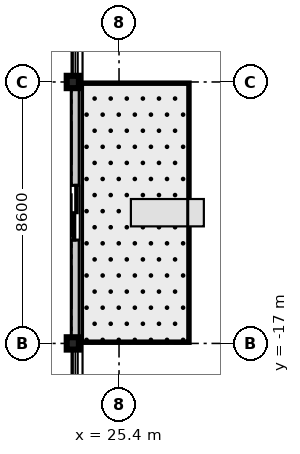
"""IFC4 building model, lengths in metres.
Left out: names, types, materials, properties, quantities, classifications, styles, units other than length and angle.
Written with IfcOpenShell. Run it as: python <this file> out.ifc"""

import sys

from ifc_helpers import new_model, si_unit, direction, frame, frame_2d, origin, origin_2d, place, context, subcontext, project, spatial, rectangle, i_section, extrude, source, transform, mapped, element, fill, save


model = new_model("IFC4")
c1 = context("Model", 3, precision=1e-05, world=origin(), true_north=direction((0.0, 1.0)))
c2 = subcontext(c1, "Body", "Model", "MODEL_VIEW")
j1 = project(units=[si_unit("LENGTHUNIT", "METRE"), si_unit("PLANEANGLEUNIT", "RADIAN")], contexts=[c1])
p1 = place(None, origin())
s1 = spatial("IfcSite", under=j1, at=p1, CompositionType="ELEMENT")
p2 = place(p1, origin())
s2 = spatial("IfcBuilding", under=s1, at=p2, CompositionType="ELEMENT")
p3 = place(p2, frame((0.0, 0.0, 249.3)))
s3 = spatial("IfcBuildingStorey", under=s2, at=p3, CompositionType="ELEMENT", Elevation=249.3)
m1 = source(origin(), c2, "Body", "SweptSolid", [
    extrude(i_section(OverallWidth=0.401, OverallDepth=0.406, WebThickness=0.016, FlangeThickness=0.025, at=origin_2d()), origin(), (0.0, 0.0, 1.0), 3.655),
])
for number, where, z_axis, x_axis in (
    (1, (23.88, -17.0, 0.0), (0.0, 0.0, 1.0), (1.0, 0.0, 0.0)),
    (2, (23.88, -8.4, 0.0), (0.0, 0.0, 1.0), (1.0, 0.0, 0.0)),
):
    element("IfcColumn", number, at=place(p3, frame(where, z_axis=z_axis, x_axis=x_axis)), inside=s3, PredefinedType="COLUMN", context=c2, shape_type="MappedRepresentation", body=[
        mapped(m1, transform((0.0, 0.0, 0.0), scale=1.0)),
    ])
m2 = source(origin(), c2, "Body", "SweptSolid", [
    extrude(rectangle(XDim=8.6, YDim=0.26, at=frame_2d((4.3, 0.0))), origin(), (0.0, 0.0, 1.0), 2.89),
])
p4 = place(p3, frame((23.96, -17.0, 0.0), z_axis=(0.0, 0.0, 1.0), x_axis=(0.0, 1.0, 0.0)))
e3 = element("IfcWall", 3, at=p4, inside=s3, PredefinedType="STANDARD", context=c2, shape_type="MappedRepresentation", body=[
    mapped(m2, transform((0.0, 0.0, 0.0), scale=1.0)),
])
p5 = place(p4, frame((3.4, 0.0, 0.0)))
e4 = element("IfcOpeningElement", 4, at=p5, cuts=e3, PredefinedType="OPENING", context=c2, shape_type="SweptSolid", body=[
    extrude(rectangle(XDim=1.8, YDim=2.25, at=frame_2d((0.9, 1.125))), frame((0.0, 0.14, 0.0), z_axis=(0.0, -1.0, 0.0), x_axis=(1.0, 0.0, 0.0)), (0.0, 0.0, 1.0), 0.28),
])
m3 = source(origin(), c2, "Body", "SweptSolid", [
    extrude(rectangle(XDim=1.8, YDim=2.25, at=frame_2d((0.9, 1.125))), frame((0.0, 0.025, 0.0), z_axis=(0.0, -1.0, 0.0), x_axis=(1.0, 0.0, 0.0)), (0.0, 0.0, 1.0), 0.05),
])
p6 = place(p5, frame((1.8, 0.0, 0.0), z_axis=(0.0, 0.0, 1.0), x_axis=(-1.0, 0.0, 0.0)))
e5 = element("IfcDoor", 5, at=p6, inside=s3, OperationType="DOUBLE_DOOR_SLIDING", PredefinedType="DOOR", context=c2, shape_type="MappedRepresentation", body=[
    mapped(m3, transform((0.0, 0.0, 0.0), scale=1.0)),
])
fill(e4, e5)
save(model, sys.argv[1])
